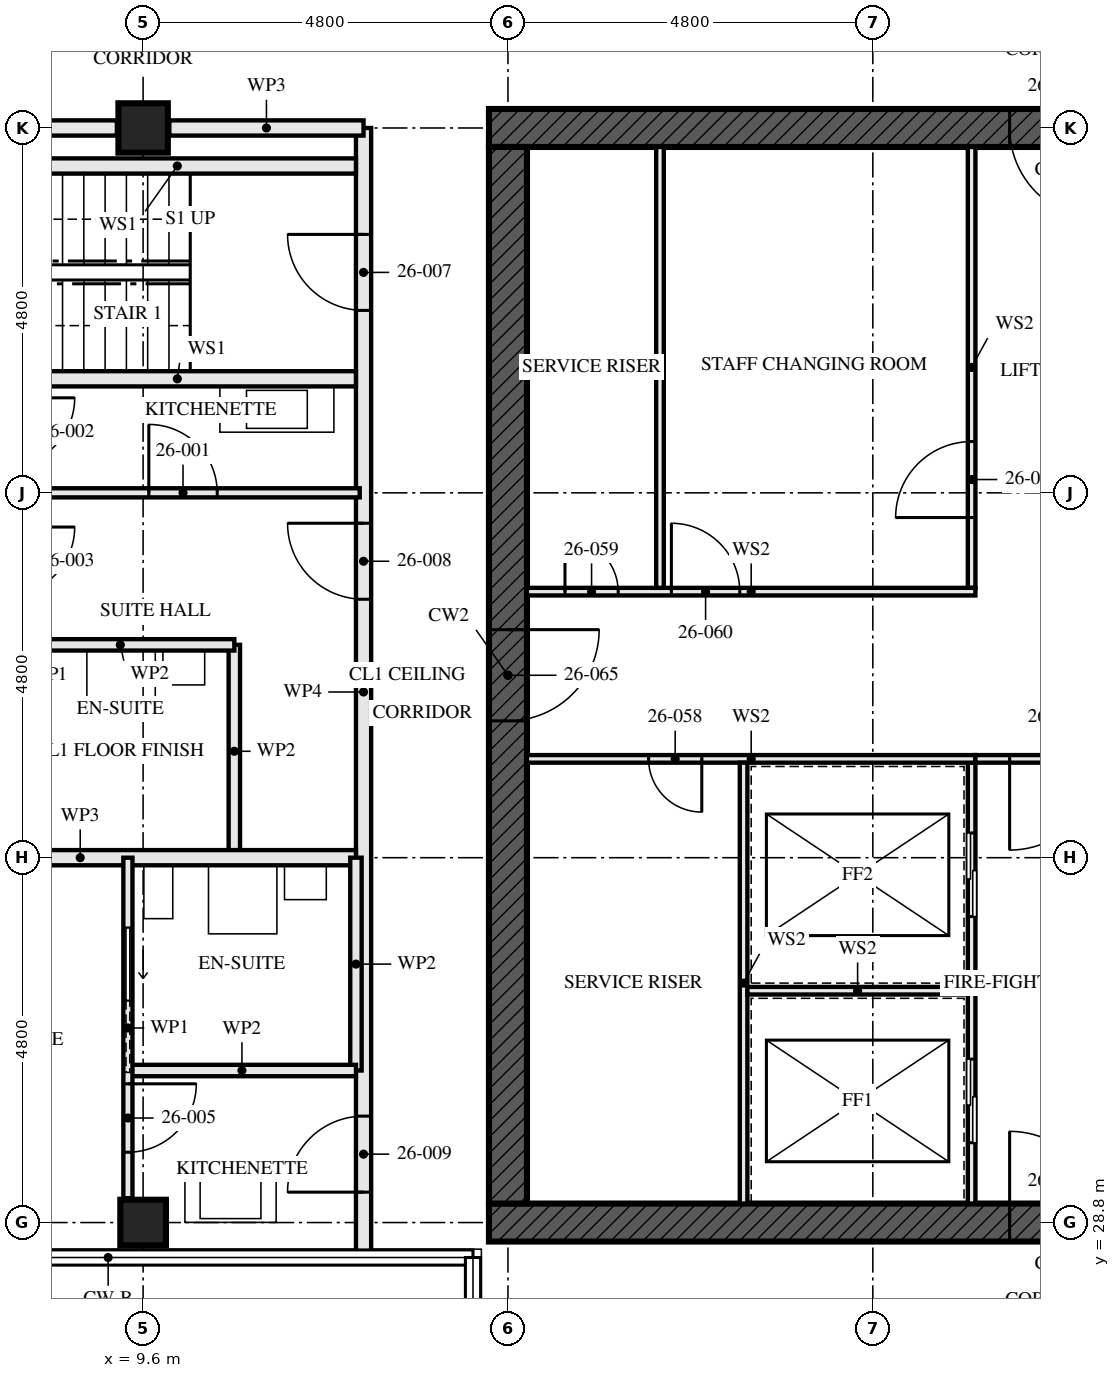
"""IFC4 building model, lengths in metres.
Left out: names, types, materials, properties, quantities, classifications, styles, units other than length and angle.
Written with IfcOpenShell. Run it as: python <this file> out.ifc"""

import sys

from ifc_helpers import new_model, si_unit, direction, frame, frame_2d, origin, origin_2d, place, context, subcontext, project, spatial, rectangle, hollow_rectangle, extrude, element, fill, save


model = new_model("IFC4")
c1 = context("Model", 3, precision=1e-05, world=origin(), true_north=direction((0.0, 1.0)))
c2 = subcontext(c1, "Body", "Model", "MODEL_VIEW")
j1 = project(units=[si_unit("LENGTHUNIT", "METRE"), si_unit("PLANEANGLEUNIT", "RADIAN")], contexts=[c1])
p1 = place(None, origin())
s1 = spatial("IfcSite", under=j1, at=p1, CompositionType="ELEMENT")
p2 = place(p1, origin())
s2 = spatial("IfcBuilding", under=s1, at=p2, CompositionType="ELEMENT")
p3 = place(p2, frame((0.0, 0.0, 98.0)))
s3 = spatial("IfcBuildingStorey", under=s2, at=p3, CompositionType="ELEMENT", Elevation=98.0)
p4 = place(p3, frame((9.6, 28.8, 0.0), z_axis=(0.0, 0.0, 1.0), x_axis=(0.0, 1.0, 0.0)))
e1 = element("IfcColumn", 1, at=p4, inside=s3, PredefinedType="COLUMN", context=c2, shape_type="SweptSolid", body=[
    extrude(hollow_rectangle(XDim=0.6, YDim=0.6, WallThickness=0.08, at=origin_2d()), origin(), (0.0, 0.0, 1.0), 3.5),
])
p5 = place(p3, frame((9.6, 43.2, 0.0), z_axis=(0.0, 0.0, 1.0), x_axis=(0.0, 1.0, 0.0)))
e2 = element("IfcColumn", 2, at=p5, inside=s3, PredefinedType="COLUMN", context=c2, shape_type="SweptSolid", body=[
    extrude(hollow_rectangle(XDim=0.65, YDim=0.65, WallThickness=0.05, at=origin_2d()), origin(), (0.0, 0.0, 1.0), 3.5),
])
p6 = place(p3, frame((14.15, 28.8, -0.17), z_axis=(0.0, 0.0, 1.0), x_axis=(1.0, 0.0, 0.0)))
e3 = element("IfcWall", 3, at=p6, inside=s3, PredefinedType="SHEAR", context=c2, shape_type="SweptSolid", body=[
    extrude(rectangle(XDim=14.9, YDim=0.5, at=frame_2d((7.45, 0.0))), origin(), (0.0, 0.0, 1.0), 3.5),
])
p7 = place(p6, frame((6.85, 0.0, 0.17)))
e4 = element("IfcOpeningElement", 4, at=p7, cuts=e3, PredefinedType="OPENING", context=c2, shape_type="SweptSolid", body=[
    extrude(rectangle(XDim=1.2, YDim=2.1, at=frame_2d((0.6, 1.05))), frame((0.0, 0.26, 0.0), z_axis=(0.0, -1.0, 0.0), x_axis=(1.0, 0.0, 0.0)), (0.0, 0.0, 1.0), 0.521),
])
p8 = place(p3, frame((29.05, 43.2, -0.17), z_axis=(0.0, 0.0, 1.0), x_axis=(-1.0, 0.0, 0.0)))
e5 = element("IfcWall", 5, at=p8, inside=s3, PredefinedType="SHEAR", context=c2, shape_type="SweptSolid", body=[
    extrude(rectangle(XDim=14.9, YDim=0.5, at=frame_2d((7.45, 0.0))), origin(), (0.0, 0.0, 1.0), 3.5),
])
p9 = place(p8, frame((6.85, 0.0, 0.17)))
e6 = element("IfcOpeningElement", 6, at=p9, cuts=e5, PredefinedType="OPENING", context=c2, shape_type="SweptSolid", body=[
    extrude(rectangle(XDim=1.2, YDim=2.1, at=frame_2d((0.6, 1.05))), frame((0.0, 0.26, 0.0), z_axis=(0.0, -1.0, 0.0), x_axis=(1.0, 0.0, 0.0)), (0.0, 0.0, 1.0), 0.521),
])
p10 = place(p3, frame((14.4, 42.95, -0.17), z_axis=(0.0, 0.0, 1.0), x_axis=(0.0, -1.0, 0.0)))
e7 = element("IfcWall", 7, at=p10, inside=s3, PredefinedType="SHEAR", context=c2, shape_type="SweptSolid", body=[
    extrude(rectangle(XDim=13.9, YDim=0.5, at=frame_2d((6.95, 0.0))), origin(), (0.0, 0.0, 1.0), 3.5),
])
p11 = place(p10, frame((6.35, 0.0, 0.17)))
e8 = element("IfcOpeningElement", 8, at=p11, cuts=e7, PredefinedType="OPENING", context=c2, shape_type="SweptSolid", body=[
    extrude(rectangle(XDim=1.2, YDim=2.1, at=frame_2d((0.6, 1.05))), frame((0.0, 0.26, 0.0), z_axis=(0.0, -1.0, 0.0), x_axis=(1.0, 0.0, 0.0)), (0.0, 0.0, 1.0), 0.521),
])
for number, where, z_axis, x_axis in (
    (9, (7.7, 42.7, 0.0), (0.0, 0.0, 1.0), (1.0, 0.0, 0.0)),
    (10, (7.7, 39.9, 0.0), (0.0, 0.0, 1.0), (1.0, 0.0, 0.0)),
):
    element("IfcWall", number, at=place(p3, frame(where, z_axis=z_axis, x_axis=x_axis)), inside=s3, PredefinedType="SOLIDWALL", context=c2, shape_type="SweptSolid", body=[
        extrude(rectangle(XDim=4.7, YDim=0.2, at=frame_2d((2.35, 0.0))), origin(), (0.0, 0.0, 1.0), 2.99),
    ])
p12 = place(p3, frame((7.8, 36.4, 0.0), z_axis=(0.0, 0.0, 1.0), x_axis=(1.0, 0.0, 0.0)))
e11 = element("IfcWall", 11, at=p12, inside=s3, PredefinedType="PARTITIONING", context=c2, shape_type="SweptSolid", body=[
    extrude(rectangle(XDim=3.0, YDim=0.15, at=frame_2d((1.5, 0.0))), origin(), (0.0, 0.0, 1.0), 3.33),
])
p13 = place(p3, frame((10.8, 36.4, 0.0), z_axis=(0.0, 0.0, 1.0), x_axis=(0.0, -1.0, 0.0)))
e12 = element("IfcWall", 12, at=p13, inside=s3, PredefinedType="PARTITIONING", context=c2, shape_type="SweptSolid", body=[
    extrude(rectangle(XDim=2.8, YDim=0.15, at=frame_2d((1.4, 0.0))), origin(), (0.0, 0.0, 1.0), 3.33),
])
p14 = place(p3, frame((7.8, 38.4, 0.0), z_axis=(0.0, 0.0, 1.0), x_axis=(1.0, 0.0, 0.0)))
e13 = element("IfcWall", 13, at=p14, inside=s3, PredefinedType="PARTITIONING", context=c2, shape_type="SweptSolid", body=[
    extrude(rectangle(XDim=4.65, YDim=0.12, at=frame_2d((2.325, 0.0))), origin(), (0.0, 0.0, 1.0), 2.55),
])
p15 = place(p14, frame((1.875, 0.0, 0.0)))
e14 = element("IfcOpeningElement", 14, at=p15, cuts=e13, PredefinedType="OPENING", context=c2, shape_type="SweptSolid", body=[
    extrude(rectangle(XDim=0.9, YDim=2.1, at=frame_2d((0.45, 1.05))), frame((0.0, 0.071, 0.0), z_axis=(0.0, -1.0, 0.0), x_axis=(1.0, 0.0, 0.0)), (0.0, 0.0, 1.0), 0.141),
])
p16 = place(p3, frame((5.145, 33.6, 0.0), z_axis=(0.0, 0.0, 1.0), x_axis=(1.0, 0.0, 0.0)))
e15 = element("IfcWall", 15, at=p16, inside=s3, PredefinedType="PARTITIONING", context=c2, shape_type="SweptSolid", body=[
    extrude(rectangle(XDim=7.255, YDim=0.2, at=frame_2d((3.627, 0.0))), origin(), (0.0, 0.0, 1.0), 2.55),
])
p17 = place(p3, frame((9.4, 30.8, 0.0), z_axis=(0.0, 0.0, 1.0), x_axis=(1.0, 0.0, 0.0)))
e16 = element("IfcWall", 16, at=p17, inside=s3, PredefinedType="PARTITIONING", context=c2, shape_type="SweptSolid", body=[
    extrude(rectangle(XDim=3.0, YDim=0.15, at=frame_2d((1.5, 0.0))), origin(), (0.0, 0.0, 1.0), 3.33),
])
p18 = place(p3, frame((12.4, 33.6, 0.0), z_axis=(0.0, 0.0, 1.0), x_axis=(0.0, -1.0, 0.0)))
e17 = element("IfcWall", 17, at=p18, inside=s3, PredefinedType="PARTITIONING", context=c2, shape_type="SweptSolid", body=[
    extrude(rectangle(XDim=2.8, YDim=0.15, at=frame_2d((1.4, 0.0))), origin(), (0.0, 0.0, 1.0), 3.33),
])
p19 = place(p3, frame((9.4, 33.6, 0.0), z_axis=(0.0, 0.0, 1.0), x_axis=(0.0, -1.0, 0.0)))
e18 = element("IfcWall", 18, at=p19, inside=s3, PredefinedType="PARTITIONING", context=c2, shape_type="SweptSolid", body=[
    extrude(rectangle(XDim=4.48, YDim=0.12, at=frame_2d((2.24, 0.0))), origin(), (0.0, 0.0, 1.0), 3.33),
])
p20 = place(p19, frame((2.975, 0.0, 0.0)))
e19 = element("IfcOpeningElement", 19, at=p20, cuts=e18, PredefinedType="OPENING", context=c2, shape_type="SweptSolid", body=[
    extrude(rectangle(XDim=0.9, YDim=2.1, at=frame_2d((0.45, 1.05))), frame((0.0, 0.071, 0.0), z_axis=(0.0, -1.0, 0.0), x_axis=(1.0, 0.0, 0.0)), (0.0, 0.0, 1.0), 0.141),
])
p21 = place(p19, frame((0.925, 0.0, 0.0)))
e20 = element("IfcOpeningElement", 20, at=p21, cuts=e18, PredefinedType="OPENING", context=c2, shape_type="SweptSolid", body=[
    extrude(rectangle(XDim=0.95, YDim=2.1, at=frame_2d((0.475, 1.05))), frame((0.0, 0.071, 0.0), z_axis=(0.0, -1.0, 0.0), x_axis=(1.0, 0.0, 0.0)), (0.0, 0.0, 1.0), 0.141),
])
p22 = place(p3, frame((12.5, 43.2, 0.0), z_axis=(0.0, 0.0, 1.0), x_axis=(0.0, -1.0, 0.0)))
e21 = element("IfcWall", 21, at=p22, inside=s3, PredefinedType="PARTITIONING", context=c2, shape_type="SweptSolid", body=[
    extrude(rectangle(XDim=14.84, YDim=0.2, at=frame_2d((7.42, 0.0))), origin(), (0.0, 0.0, 1.0), 2.32),
])
p23 = place(p22, frame((1.4, 0.0, 0.0)))
e22 = element("IfcOpeningElement", 22, at=p23, cuts=e21, PredefinedType="OPENING", context=c2, shape_type="SweptSolid", body=[
    extrude(rectangle(XDim=1.0, YDim=2.1, at=frame_2d((0.5, 1.05))), frame((0.0, 0.111, 0.0), z_axis=(0.0, -1.0, 0.0), x_axis=(1.0, 0.0, 0.0)), (0.0, 0.0, 1.0), 0.221),
])
p24 = place(p22, frame((5.2, 0.0, 0.0)))
e23 = element("IfcOpeningElement", 23, at=p24, cuts=e21, PredefinedType="OPENING", context=c2, shape_type="SweptSolid", body=[
    extrude(rectangle(XDim=1.0, YDim=2.1, at=frame_2d((0.5, 1.05))), frame((0.0, 0.111, 0.0), z_axis=(0.0, -1.0, 0.0), x_axis=(1.0, 0.0, 0.0)), (0.0, 0.0, 1.0), 0.221),
])
p25 = place(p22, frame((13.0, 0.0, 0.0)))
e24 = element("IfcOpeningElement", 24, at=p25, cuts=e21, PredefinedType="OPENING", context=c2, shape_type="SweptSolid", body=[
    extrude(rectangle(XDim=1.0, YDim=2.1, at=frame_2d((0.5, 1.05))), frame((0.0, 0.111, 0.0), z_axis=(0.0, -1.0, 0.0), x_axis=(1.0, 0.0, 0.0)), (0.0, 0.0, 1.0), 0.221),
])
p26 = place(p3, frame((16.4, 37.15, 0.0), z_axis=(0.0, 0.0, 1.0), x_axis=(0.0, 1.0, 0.0)))
e25 = element("IfcWall", 25, at=p26, inside=s3, PredefinedType="SOLIDWALL", context=c2, shape_type="SweptSolid", body=[
    extrude(rectangle(XDim=5.8, YDim=0.1, at=frame_2d((2.9, 0.0))), origin(), (0.0, 0.0, 1.0), 3.33),
])
p27 = place(p3, frame((20.5, 29.05, 0.0), z_axis=(0.0, 0.0, 1.0), x_axis=(0.0, 1.0, 0.0)))
e26 = element("IfcWall", 26, at=p27, inside=s3, PredefinedType="SOLIDWALL", context=c2, shape_type="SweptSolid", body=[
    extrude(rectangle(XDim=5.8, YDim=0.1, at=frame_2d((2.9, 0.0))), origin(), (0.0, 0.0, 1.0), 3.33),
])
p28 = place(p27, frame((0.8, 0.0, 0.0)))
e27 = element("IfcOpeningElement", 27, at=p28, cuts=e26, PredefinedType="OPENING", context=c2, shape_type="SweptSolid", body=[
    extrude(rectangle(XDim=1.1, YDim=2.3, at=frame_2d((0.55, 1.15))), frame((0.0, 0.061, 0.0), z_axis=(0.0, -1.0, 0.0), x_axis=(1.0, 0.0, 0.0)), (0.0, 0.0, 1.0), 0.121),
])
p29 = place(p27, frame((3.775, 0.0, 0.0)))
e28 = element("IfcOpeningElement", 28, at=p29, cuts=e26, PredefinedType="OPENING", context=c2, shape_type="SweptSolid", body=[
    extrude(rectangle(XDim=1.1, YDim=2.3, at=frame_2d((0.55, 1.15))), frame((0.0, 0.061, 0.0), z_axis=(0.0, -1.0, 0.0), x_axis=(1.0, 0.0, 0.0)), (0.0, 0.0, 1.0), 0.121),
])
p30 = place(p3, frame((20.5, 37.15, 0.0), z_axis=(0.0, 0.0, 1.0), x_axis=(0.0, 1.0, 0.0)))
e29 = element("IfcWall", 29, at=p30, inside=s3, PredefinedType="SOLIDWALL", context=c2, shape_type="SweptSolid", body=[
    extrude(rectangle(XDim=5.8, YDim=0.1, at=frame_2d((2.9, 0.0))), origin(), (0.0, 0.0, 1.0), 3.33),
])
p31 = place(p30, frame((0.925, 0.0, 0.0)))
e30 = element("IfcOpeningElement", 30, at=p31, cuts=e29, PredefinedType="OPENING", context=c2, shape_type="SweptSolid", body=[
    extrude(rectangle(XDim=1.0, YDim=2.1, at=frame_2d((0.5, 1.05))), frame((0.0, 0.061, 0.0), z_axis=(0.0, -1.0, 0.0), x_axis=(1.0, 0.0, 0.0)), (0.0, 0.0, 1.0), 0.121),
])
p32 = place(p3, frame((14.65, 34.9, 0.0), z_axis=(0.0, 0.0, 1.0), x_axis=(1.0, 0.0, 0.0)))
e31 = element("IfcWall", 31, at=p32, inside=s3, PredefinedType="SOLIDWALL", context=c2, shape_type="SweptSolid", body=[
    extrude(rectangle(XDim=5.9, YDim=0.1, at=frame_2d((2.95, 0.0))), origin(), (0.0, 0.0, 1.0), 3.33),
])
p33 = place(p32, frame((1.6, 0.0, 0.0)))
e32 = element("IfcOpeningElement", 32, at=p33, cuts=e31, PredefinedType="OPENING", context=c2, shape_type="SweptSolid", body=[
    extrude(rectangle(XDim=0.7, YDim=2.1, at=frame_2d((0.35, 1.05))), frame((0.0, 0.061, 0.0), z_axis=(0.0, -1.0, 0.0), x_axis=(1.0, 0.0, 0.0)), (0.0, 0.0, 1.0), 0.121),
])
p34 = place(p3, frame((14.65, 37.1, 0.0), z_axis=(0.0, 0.0, 1.0), x_axis=(1.0, 0.0, 0.0)))
e33 = element("IfcWall", 33, at=p34, inside=s3, PredefinedType="SOLIDWALL", context=c2, shape_type="SweptSolid", body=[
    extrude(rectangle(XDim=5.9, YDim=0.1, at=frame_2d((2.95, 0.0))), origin(), (0.0, 0.0, 1.0), 3.33),
])
p35 = place(p34, frame((0.5, 0.0, 0.0)))
e34 = element("IfcOpeningElement", 34, at=p35, cuts=e33, PredefinedType="OPENING", context=c2, shape_type="SweptSolid", body=[
    extrude(rectangle(XDim=0.7, YDim=2.1, at=frame_2d((0.35, 1.05))), frame((0.0, 0.061, 0.0), z_axis=(0.0, -1.0, 0.0), x_axis=(1.0, 0.0, 0.0)), (0.0, 0.0, 1.0), 0.121),
])
p36 = place(p34, frame((1.9, 0.0, 0.0)))
e35 = element("IfcOpeningElement", 35, at=p36, cuts=e33, PredefinedType="OPENING", context=c2, shape_type="SweptSolid", body=[
    extrude(rectangle(XDim=0.9, YDim=2.1, at=frame_2d((0.45, 1.05))), frame((0.0, 0.061, 0.0), z_axis=(0.0, -1.0, 0.0), x_axis=(1.0, 0.0, 0.0)), (0.0, 0.0, 1.0), 0.121),
])
p37 = place(p3, frame((20.55, 34.9, 0.0), z_axis=(0.0, 0.0, 1.0), x_axis=(1.0, 0.0, 0.0)))
e36 = element("IfcWall", 36, at=p37, inside=s3, PredefinedType="SOLIDWALL", context=c2, shape_type="SweptSolid", body=[
    extrude(rectangle(XDim=2.5, YDim=0.1, at=frame_2d((1.25, 0.0))), origin(), (0.0, 0.0, 1.0), 3.33),
])
p38 = place(p37, frame((0.45, 0.0, 0.0)))
e37 = element("IfcOpeningElement", 37, at=p38, cuts=e36, PredefinedType="OPENING", context=c2, shape_type="SweptSolid", body=[
    extrude(rectangle(XDim=1.2, YDim=2.1, at=frame_2d((0.6, 1.05))), frame((0.0, 0.061, 0.0), z_axis=(0.0, -1.0, 0.0), x_axis=(1.0, 0.0, 0.0)), (0.0, 0.0, 1.0), 0.121),
])
p39 = place(p3, frame((17.5, 29.05, 0.0), z_axis=(0.0, 0.0, 1.0), x_axis=(0.0, 1.0, 0.0)))
e38 = element("IfcWall", 38, at=p39, inside=s3, PredefinedType="SOLIDWALL", context=c2, shape_type="SweptSolid", body=[
    extrude(rectangle(XDim=5.8, YDim=0.1, at=frame_2d((2.9, 0.0))), origin(), (0.0, 0.0, 1.0), 3.33),
])
p40 = place(p3, frame((17.55, 31.85, 0.0), z_axis=(0.0, 0.0, 1.0), x_axis=(1.0, 0.0, 0.0)))
e39 = element("IfcWall", 39, at=p40, inside=s3, PredefinedType="SOLIDWALL", context=c2, shape_type="SweptSolid", body=[
    extrude(rectangle(XDim=2.9, YDim=0.1, at=frame_2d((1.45, 0.0))), origin(), (0.0, 0.0, 1.0), 3.33),
])
p41 = place(p3, frame((12.5, 43.2, 0.0), z_axis=(0.0, 0.0, 1.0), x_axis=(-1.0, 0.0, 0.0)))
e40 = element("IfcWall", 40, at=p41, inside=s3, PredefinedType="PARTITIONING", context=c2, shape_type="SweptSolid", body=[
    extrude(rectangle(XDim=2.555, YDim=0.2, at=frame_2d((1.277, 0.0))), origin(), (0.0, 0.0, 1.0), 2.32),
])
p42 = place(p3, frame((9.255, 43.2, 0.0), z_axis=(0.0, 0.0, 1.0), x_axis=(-1.0, 0.0, 0.0)))
e41 = element("IfcWall", 41, at=p42, inside=s3, PredefinedType="PARTITIONING", context=c2, shape_type="SweptSolid", body=[
    extrude(rectangle(XDim=4.11, YDim=0.2, at=frame_2d((2.055, 0.0))), origin(), (0.0, 0.0, 1.0), 2.32),
])
p43 = place(p15, origin())
e42 = element("IfcDoor", 42, at=p43, inside=s3, OperationType="SINGLE_SWING_RIGHT", PredefinedType="DOOR", context=c2, shape_type="SweptSolid", body=[
    extrude(rectangle(XDim=0.9, YDim=2.1, at=frame_2d((0.45, 1.05))), frame((0.0, 0.022, 0.0), z_axis=(0.0, -1.0, 0.0), x_axis=(1.0, 0.0, 0.0)), (0.0, 0.0, 1.0), 0.044),
])
fill(e14, e42)
p44 = place(p20, origin())
e43 = element("IfcDoor", 43, at=p44, inside=s3, OperationType="SINGLE_SWING_RIGHT", PredefinedType="DOOR", context=c2, shape_type="SweptSolid", body=[
    extrude(rectangle(XDim=0.9, YDim=2.1, at=frame_2d((0.45, 1.05))), frame((0.0, 0.022, 0.0), z_axis=(0.0, -1.0, 0.0), x_axis=(1.0, 0.0, 0.0)), (0.0, 0.0, 1.0), 0.044),
])
fill(e19, e43)
p45 = place(p21, origin())
e44 = element("IfcDoor", 44, at=p45, inside=s3, OperationType="SLIDING_TO_LEFT", PredefinedType="DOOR", context=c2, shape_type="SweptSolid", body=[
    extrude(rectangle(XDim=0.95, YDim=2.1, at=frame_2d((0.475, 1.05))), frame((0.0, 0.022, 0.0), z_axis=(0.0, -1.0, 0.0), x_axis=(1.0, 0.0, 0.0)), (0.0, 0.0, 1.0), 0.044),
])
fill(e20, e44)
p46 = place(p23, frame((1.0, 0.0, 0.0), z_axis=(0.0, 0.0, 1.0), x_axis=(-1.0, 0.0, 0.0)))
e45 = element("IfcDoor", 45, at=p46, inside=s3, OperationType="SINGLE_SWING_LEFT", PredefinedType="DOOR", context=c2, shape_type="SweptSolid", body=[
    extrude(rectangle(XDim=1.0, YDim=2.1, at=frame_2d((0.5, 1.05))), frame((0.0, 0.032, 0.0), z_axis=(0.0, -1.0, 0.0), x_axis=(1.0, 0.0, 0.0)), (0.0, 0.0, 1.0), 0.064),
])
fill(e22, e45)
p47 = place(p24, frame((1.0, 0.0, 0.0), z_axis=(0.0, 0.0, 1.0), x_axis=(-1.0, 0.0, 0.0)))
e46 = element("IfcDoor", 46, at=p47, inside=s3, OperationType="SINGLE_SWING_LEFT", PredefinedType="DOOR", context=c2, shape_type="SweptSolid", body=[
    extrude(rectangle(XDim=1.0, YDim=2.1, at=frame_2d((0.5, 1.05))), frame((0.0, 0.027, 0.0), z_axis=(0.0, -1.0, 0.0), x_axis=(1.0, 0.0, 0.0)), (0.0, 0.0, 1.0), 0.054),
])
fill(e23, e46)
p48 = place(p25, frame((1.0, 0.0, 0.0), z_axis=(0.0, 0.0, 1.0), x_axis=(-1.0, 0.0, 0.0)))
e47 = element("IfcDoor", 47, at=p48, inside=s3, OperationType="SINGLE_SWING_RIGHT", PredefinedType="DOOR", context=c2, shape_type="SweptSolid", body=[
    extrude(rectangle(XDim=1.0, YDim=2.1, at=frame_2d((0.5, 1.05))), frame((0.0, 0.027, 0.0), z_axis=(0.0, -1.0, 0.0), x_axis=(1.0, 0.0, 0.0)), (0.0, 0.0, 1.0), 0.054),
])
fill(e24, e47)
p49 = place(p28, origin())
e48 = element("IfcDoor", 48, at=p49, inside=s3, OperationType="SLIDING_TO_LEFT", PredefinedType="DOOR", context=c2, shape_type="SweptSolid", body=[
    extrude(rectangle(XDim=1.1, YDim=2.3, at=frame_2d((0.55, 1.15))), frame((0.0, 0.05, 0.0), z_axis=(0.0, -1.0, 0.0), x_axis=(1.0, 0.0, 0.0)), (0.0, 0.0, 1.0), 0.1),
])
fill(e27, e48)
p50 = place(p29, origin())
e49 = element("IfcDoor", 49, at=p50, inside=s3, OperationType="SLIDING_TO_LEFT", PredefinedType="DOOR", context=c2, shape_type="SweptSolid", body=[
    extrude(rectangle(XDim=1.1, YDim=2.3, at=frame_2d((0.55, 1.15))), frame((0.0, 0.05, 0.0), z_axis=(0.0, -1.0, 0.0), x_axis=(1.0, 0.0, 0.0)), (0.0, 0.0, 1.0), 0.1),
])
fill(e28, e49)
p51 = place(p31, origin())
e50 = element("IfcDoor", 50, at=p51, inside=s3, OperationType="SINGLE_SWING_RIGHT", PredefinedType="DOOR", context=c2, shape_type="SweptSolid", body=[
    extrude(rectangle(XDim=1.0, YDim=2.1, at=frame_2d((0.5, 1.05))), frame((0.0, 0.027, 0.0), z_axis=(0.0, -1.0, 0.0), x_axis=(1.0, 0.0, 0.0)), (0.0, 0.0, 1.0), 0.054),
])
fill(e30, e50)
p52 = place(p33, frame((0.7, 0.0, 0.0), z_axis=(0.0, 0.0, 1.0), x_axis=(-1.0, 0.0, 0.0)))
e51 = element("IfcDoor", 51, at=p52, inside=s3, OperationType="SINGLE_SWING_RIGHT", PredefinedType="DOOR", context=c2, shape_type="SweptSolid", body=[
    extrude(rectangle(XDim=0.7, YDim=2.1, at=frame_2d((0.35, 1.05))), frame((0.0, 0.027, 0.0), z_axis=(0.0, -1.0, 0.0), x_axis=(1.0, 0.0, 0.0)), (0.0, 0.0, 1.0), 0.054),
])
fill(e32, e51)
p53 = place(p35, origin())
e52 = element("IfcDoor", 52, at=p53, inside=s3, OperationType="SINGLE_SWING_RIGHT", PredefinedType="DOOR", context=c2, shape_type="SweptSolid", body=[
    extrude(rectangle(XDim=0.7, YDim=2.1, at=frame_2d((0.35, 1.05))), frame((0.0, 0.027, 0.0), z_axis=(0.0, -1.0, 0.0), x_axis=(1.0, 0.0, 0.0)), (0.0, 0.0, 1.0), 0.054),
])
fill(e34, e52)
p54 = place(p36, origin())
e53 = element("IfcDoor", 53, at=p54, inside=s3, OperationType="SINGLE_SWING_RIGHT", PredefinedType="DOOR", context=c2, shape_type="SweptSolid", body=[
    extrude(rectangle(XDim=0.9, YDim=2.1, at=frame_2d((0.45, 1.05))), frame((0.0, 0.027, 0.0), z_axis=(0.0, -1.0, 0.0), x_axis=(1.0, 0.0, 0.0)), (0.0, 0.0, 1.0), 0.054),
])
fill(e35, e53)
p55 = place(p38, frame((1.2, 0.0, 0.0), z_axis=(0.0, 0.0, 1.0), x_axis=(-1.0, 0.0, 0.0)))
e54 = element("IfcDoor", 54, at=p55, inside=s3, OperationType="SINGLE_SWING_LEFT", PredefinedType="DOOR", context=c2, shape_type="SweptSolid", body=[
    extrude(rectangle(XDim=1.2, YDim=2.1, at=frame_2d((0.6, 1.05))), frame((0.0, 0.027, 0.0), z_axis=(0.0, -1.0, 0.0), x_axis=(1.0, 0.0, 0.0)), (0.0, 0.0, 1.0), 0.054),
])
fill(e37, e54)
p56 = place(p7, origin())
e55 = element("IfcDoor", 55, at=p56, inside=s3, OperationType="SINGLE_SWING_LEFT", PredefinedType="DOOR", context=c2, shape_type="SweptSolid", body=[
    extrude(rectangle(XDim=1.2, YDim=2.1, at=frame_2d((0.6, 1.05))), frame((0.0, 0.027, 0.0), z_axis=(0.0, -1.0, 0.0), x_axis=(1.0, 0.0, 0.0)), (0.0, 0.0, 1.0), 0.054),
])
fill(e4, e55)
p57 = place(p11, origin())
e56 = element("IfcDoor", 56, at=p57, inside=s3, OperationType="SINGLE_SWING_LEFT", PredefinedType="DOOR", context=c2, shape_type="SweptSolid", body=[
    extrude(rectangle(XDim=1.2, YDim=2.1, at=frame_2d((0.6, 1.05))), frame((0.0, 0.027, 0.0), z_axis=(0.0, -1.0, 0.0), x_axis=(1.0, 0.0, 0.0)), (0.0, 0.0, 1.0), 0.054),
])
fill(e8, e56)
p58 = place(p9, origin())
e57 = element("IfcDoor", 57, at=p58, inside=s3, OperationType="SINGLE_SWING_LEFT", PredefinedType="DOOR", context=c2, shape_type="SweptSolid", body=[
    extrude(rectangle(XDim=1.2, YDim=2.1, at=frame_2d((0.6, 1.05))), frame((0.0, 0.027, 0.0), z_axis=(0.0, -1.0, 0.0), x_axis=(1.0, 0.0, 0.0)), (0.0, 0.0, 1.0), 0.054),
])
fill(e6, e57)
save(model, sys.argv[1])
